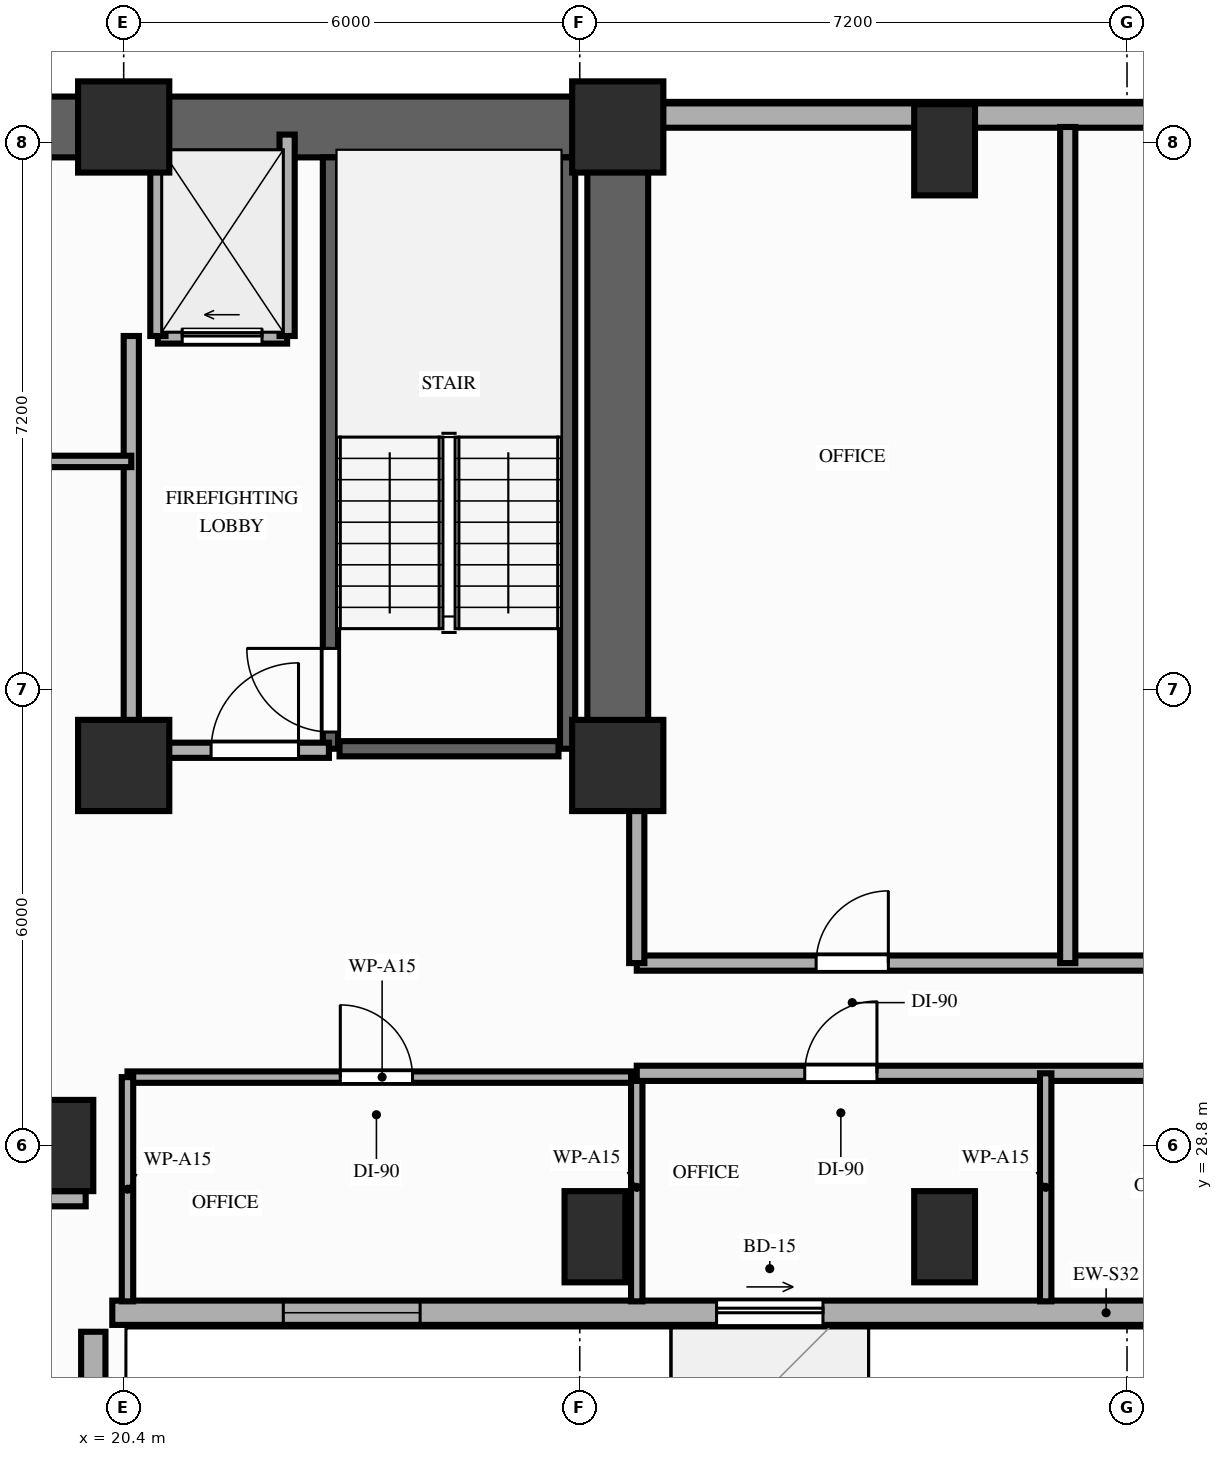
"""IFC4 building model, lengths in metres.
Left out: names, types, materials, properties, quantities, classifications, styles, units other than length and angle.
Written with IfcOpenShell. Run it as: python <this file> out.ifc"""

import sys

from ifc_helpers import new_model, si_unit, direction, frame, frame_2d, origin, origin_2d, place, context, subcontext, project, spatial, rectangle, extrude, element, fill, save


model = new_model("IFC4")
c1 = context("Model", 3, precision=1e-05, world=origin(), true_north=direction((0.0, 1.0)))
c2 = subcontext(c1, "Body", "Model", "MODEL_VIEW")
j1 = project(units=[si_unit("LENGTHUNIT", "METRE"), si_unit("PLANEANGLEUNIT", "RADIAN")], contexts=[c1])
p1 = place(None, origin())
s1 = spatial("IfcSite", under=j1, at=p1, CompositionType="ELEMENT")
p2 = place(p1, origin())
s2 = spatial("IfcBuilding", under=s1, at=p2, CompositionType="ELEMENT")
p3 = place(p2, frame((0.0, 0.0, 86.6)))
s3 = spatial("IfcBuildingStorey", under=s2, at=p3, CompositionType="ELEMENT", Elevation=86.6)
for number, where, z_axis, x_axis in (
    (1, (20.4, 33.8, 0.0), (0.0, 0.0, 1.0), (1.0, 0.0, 0.0)),
    (2, (26.9, 33.8, 0.0), (0.0, 0.0, 1.0), (1.0, 0.0, 0.0)),
    (3, (20.4, 42.2, 0.0), (0.0, 0.0, 1.0), (1.0, 0.0, 0.0)),
    (4, (26.9, 42.2, 0.0), (0.0, 0.0, 1.0), (1.0, 0.0, 0.0)),
):
    element("IfcColumn", number, at=place(p3, frame(where, z_axis=z_axis, x_axis=x_axis)), inside=s3, PredefinedType="COLUMN", context=c2, shape_type="SweptSolid", body=[
        extrude(rectangle(XDim=1.2, YDim=1.2, at=origin_2d()), origin(), (0.0, 0.0, 1.0), 3.2),
    ])
for number, where, z_axis, x_axis in (
    (5, (19.6, 28.8, 0.0), (0.0, 0.0, 1.0), (1.0, 0.0, 0.0)),
    (6, (26.6, 27.6, 0.0), (0.0, 0.0, 1.0), (1.0, 0.0, 0.0)),
    (7, (31.2, 27.6, 0.0), (0.0, 0.0, 1.0), (1.0, 0.0, 0.0)),
    (8, (31.2, 41.9, 0.0), (0.0, 0.0, 1.0), (1.0, 0.0, 0.0)),
):
    element("IfcColumn", number, at=place(p3, frame(where, z_axis=z_axis, x_axis=x_axis)), inside=s3, PredefinedType="COLUMN", context=c2, shape_type="SweptSolid", body=[
        extrude(rectangle(XDim=0.8, YDim=1.2, at=origin_2d()), origin(), (0.0, 0.0, 1.0), 3.2),
    ])
p4 = place(p3, frame((20.0, 8.8, 0.0), z_axis=(0.0, 0.0, 1.0), x_axis=(0.0, 1.0, 0.0)))
e9 = element("IfcWall", 9, at=p4, inside=s3, PredefinedType="STANDARD", context=c2, shape_type="SweptSolid", body=[
    extrude(rectangle(XDim=17.55, YDim=0.32, at=frame_2d((8.775, 0.0))), origin(), (0.0, 0.0, 1.0), 2.4),
])
p5 = place(p4, frame((11.67, 0.0, 0.85)))
e10 = element("IfcOpeningElement", 10, at=p5, cuts=e9, PredefinedType="OPENING", context=c2, shape_type="SweptSolid", body=[
    extrude(rectangle(XDim=1.8, YDim=1.3, at=frame_2d((0.9, 0.65))), frame((0.0, 0.17, 0.0), z_axis=(0.0, -1.0, 0.0), x_axis=(1.0, 0.0, 0.0)), (0.0, 0.0, 1.0), 0.34),
])
p6 = place(p4, frame((5.6, 0.0, 0.85)))
e11 = element("IfcOpeningElement", 11, at=p6, cuts=e9, PredefinedType="OPENING", context=c2, shape_type="SweptSolid", body=[
    extrude(rectangle(XDim=1.8, YDim=1.3, at=frame_2d((0.9, 0.65))), frame((0.0, 0.17, 0.0), z_axis=(0.0, -1.0, 0.0), x_axis=(1.0, 0.0, 0.0)), (0.0, 0.0, 1.0), 0.34),
])
p7 = place(p3, frame((46.4, 42.35, 0.0), z_axis=(0.0, 0.0, 1.0), x_axis=(-1.0, 0.0, 0.0)))
e12 = element("IfcWall", 12, at=p7, inside=s3, PredefinedType="STANDARD", context=c2, shape_type="SweptSolid", body=[
    extrude(rectangle(XDim=19.05, YDim=0.32, at=frame_2d((9.525, 0.0))), origin(), (0.0, 0.0, 1.0), 2.4),
])
p8 = place(p3, frame((20.25, 26.6, 0.0), z_axis=(0.0, 0.0, 1.0), x_axis=(1.0, 0.0, 0.0)))
e13 = element("IfcWall", 13, at=p8, inside=s3, PredefinedType="STANDARD", context=c2, shape_type="SweptSolid", body=[
    extrude(rectangle(XDim=26.15, YDim=0.32, at=frame_2d((13.075, 0.0))), origin(), (0.0, 0.0, 1.0), 2.7),
])
p9 = place(p8, frame((7.95, 0.0, 0.0)))
e14 = element("IfcOpeningElement", 14, at=p9, cuts=e13, PredefinedType="OPENING", context=c2, shape_type="SweptSolid", body=[
    extrude(rectangle(XDim=1.4, YDim=2.1, at=frame_2d((0.7, 1.05))), frame((0.0, 0.17, 0.0), z_axis=(0.0, -1.0, 0.0), x_axis=(1.0, 0.0, 0.0)), (0.0, 0.0, 1.0), 0.34),
])
p10 = place(p8, frame((22.45, 0.0, 0.0)))
e15 = element("IfcOpeningElement", 15, at=p10, cuts=e13, PredefinedType="OPENING", context=c2, shape_type="SweptSolid", body=[
    extrude(rectangle(XDim=1.4, YDim=2.1, at=frame_2d((0.7, 1.05))), frame((0.0, 0.17, 0.0), z_axis=(0.0, -1.0, 0.0), x_axis=(1.0, 0.0, 0.0)), (0.0, 0.0, 1.0), 0.34),
])
p11 = place(p8, frame((2.25, 0.0, 0.85)))
e16 = element("IfcOpeningElement", 16, at=p11, cuts=e13, PredefinedType="OPENING", context=c2, shape_type="SweptSolid", body=[
    extrude(rectangle(XDim=1.8, YDim=1.6, at=frame_2d((0.9, 0.8))), frame((0.0, 0.17, 0.0), z_axis=(0.0, -1.0, 0.0), x_axis=(1.0, 0.0, 0.0)), (0.0, 0.0, 1.0), 0.34),
])
p12 = place(p8, frame((13.65, 0.0, 0.85)))
e17 = element("IfcOpeningElement", 17, at=p12, cuts=e13, PredefinedType="OPENING", context=c2, shape_type="SweptSolid", body=[
    extrude(rectangle(XDim=1.8, YDim=1.6, at=frame_2d((0.9, 0.8))), frame((0.0, 0.17, 0.0), z_axis=(0.0, -1.0, 0.0), x_axis=(1.0, 0.0, 0.0)), (0.0, 0.0, 1.0), 0.34),
])
p13 = place(p3, frame((6.45, 42.2, 0.0), z_axis=(0.0, 0.0, 1.0), x_axis=(1.0, 0.0, 0.0)))
e18 = element("IfcWall", 18, at=p13, inside=s3, PredefinedType="SHEAR", context=c2, shape_type="SweptSolid", body=[
    extrude(rectangle(XDim=20.45, YDim=0.8, at=frame_2d((10.225, 0.0))), origin(), (0.0, 0.0, 1.0), 3.02),
])
p14 = place(p3, frame((26.9, 33.8, 0.0), z_axis=(0.0, 0.0, 1.0), x_axis=(0.0, 1.0, 0.0)))
e19 = element("IfcWall", 19, at=p14, inside=s3, PredefinedType="SHEAR", context=c2, shape_type="SweptSolid", body=[
    extrude(rectangle(XDim=7.95, YDim=0.8, at=frame_2d((3.975, 0.0))), origin(), (0.0, 0.0, 1.0), 3.02),
])
p15 = place(p3, frame((23.12, 34.02, 0.0), z_axis=(0.0, 0.0, 1.0), x_axis=(0.0, 1.0, 0.0)))
e20 = element("IfcWall", 20, at=p15, inside=s3, PredefinedType="SHEAR", context=c2, shape_type="SweptSolid", body=[
    extrude(rectangle(XDim=7.78, YDim=0.2, at=frame_2d((3.89, 0.0))), origin(), (0.0, 0.0, 1.0), 3.02),
])
p16 = place(p15, frame((0.22, 0.0, 0.0)))
e21 = element("IfcOpeningElement", 21, at=p16, cuts=e20, PredefinedType="OPENING", context=c2, shape_type="SweptSolid", body=[
    extrude(rectangle(XDim=1.1, YDim=2.15, at=frame_2d((0.55, 1.075))), frame((0.0, 0.11, 0.0), z_axis=(0.0, -1.0, 0.0), x_axis=(1.0, 0.0, 0.0)), (0.0, 0.0, 1.0), 0.22),
])
p17 = place(p3, frame((26.24, 34.02, 0.0), z_axis=(0.0, 0.0, 1.0), x_axis=(0.0, 1.0, 0.0)))
e22 = element("IfcWall", 22, at=p17, inside=s3, PredefinedType="SHEAR", context=c2, shape_type="SweptSolid", body=[
    extrude(rectangle(XDim=7.78, YDim=0.2, at=frame_2d((3.89, 0.0))), origin(), (0.0, 0.0, 1.0), 3.02),
])
p18 = place(p3, frame((23.24, 34.02, 0.0), z_axis=(0.0, 0.0, 1.0), x_axis=(1.0, 0.0, 0.0)))
e23 = element("IfcWall", 23, at=p18, inside=s3, PredefinedType="SHEAR", context=c2, shape_type="SweptSolid", body=[
    extrude(rectangle(XDim=2.88, YDim=0.2, at=frame_2d((1.44, 0.0))), origin(), (0.0, 0.0, 1.0), 3.02),
])
p19 = place(p3, frame((20.85, 39.45, 0.0), z_axis=(0.0, 0.0, 1.0), x_axis=(1.0, 0.0, 0.0)))
e24 = element("IfcWall", 24, at=p19, inside=s3, PredefinedType="MOVABLE", context=c2, shape_type="SweptSolid", body=[
    extrude(rectangle(XDim=1.7, YDim=0.2, at=frame_2d((0.85, 0.0))), origin(), (0.0, 0.0, 1.0), 3.02),
])
p20 = place(p19, frame((0.32, 0.0, 0.0)))
e25 = element("IfcOpeningElement", 25, at=p20, cuts=e24, PredefinedType="OPENING", context=c2, shape_type="SweptSolid", body=[
    extrude(rectangle(XDim=1.05, YDim=2.15, at=frame_2d((0.525, 1.075))), frame((0.0, 0.11, 0.0), z_axis=(0.0, -1.0, 0.0), x_axis=(1.0, 0.0, 0.0)), (0.0, 0.0, 1.0), 0.22),
])
for number, where, z_axis, x_axis in (
    (26, (20.85, 39.45, 0.0), (0.0, 0.0, 1.0), (0.0, 1.0, 0.0)),
    (27, (22.55, 39.45, 0.0), (0.0, 0.0, 1.0), (0.0, 1.0, 0.0)),
):
    element("IfcWall", number, at=place(p3, frame(where, z_axis=z_axis, x_axis=x_axis)), inside=s3, PredefinedType="MOVABLE", context=c2, shape_type="SweptSolid", body=[
        extrude(rectangle(XDim=2.65, YDim=0.2, at=frame_2d((1.325, 0.0))), origin(), (0.0, 0.0, 1.0), 2.4),
    ])
p21 = place(p3, frame((20.5, 34.0, 0.0), z_axis=(0.0, 0.0, 1.0), x_axis=(0.0, 1.0, 0.0)))
e28 = element("IfcWall", 28, at=p21, inside=s3, PredefinedType="PARTITIONING", context=c2, shape_type="SweptSolid", body=[
    extrude(rectangle(XDim=5.45, YDim=0.2, at=frame_2d((2.725, 0.0))), origin(), (0.0, 0.0, 1.0), 2.4),
])
p22 = place(p3, frame((20.5, 34.0, 0.0), z_axis=(0.0, 0.0, 1.0), x_axis=(1.0, 0.0, 0.0)))
e29 = element("IfcWall", 29, at=p22, inside=s3, PredefinedType="PARTITIONING", context=c2, shape_type="SweptSolid", body=[
    extrude(rectangle(XDim=2.6, YDim=0.2, at=frame_2d((1.3, 0.0))), origin(), (0.0, 0.0, 1.0), 2.4),
])
p23 = place(p22, frame((1.05, 0.0, 0.0)))
e30 = element("IfcOpeningElement", 30, at=p23, cuts=e29, PredefinedType="OPENING", context=c2, shape_type="SweptSolid", body=[
    extrude(rectangle(XDim=1.15, YDim=2.15, at=frame_2d((0.575, 1.075))), frame((0.0, 0.11, 0.0), z_axis=(0.0, -1.0, 0.0), x_axis=(1.0, 0.0, 0.0)), (0.0, 0.0, 1.0), 0.22),
])
p24 = place(p3, frame((12.9, 37.8, 0.0), z_axis=(0.0, 0.0, 1.0), x_axis=(1.0, 0.0, 0.0)))
e31 = element("IfcWall", 31, at=p24, inside=s3, PredefinedType="PARTITIONING", context=c2, shape_type="SweptSolid", body=[
    extrude(rectangle(XDim=7.6, YDim=0.15, at=frame_2d((3.8, 0.0))), origin(), (0.0, 0.0, 1.0), 3.02),
])
p25 = place(p24, frame((3.2, 0.0, 0.0)))
e32 = element("IfcOpeningElement", 32, at=p25, cuts=e31, PredefinedType="OPENING", context=c2, shape_type="SweptSolid", body=[
    extrude(rectangle(XDim=1.0, YDim=2.15, at=frame_2d((0.5, 1.075))), frame((0.0, 0.085, 0.0), z_axis=(0.0, -1.0, 0.0), x_axis=(1.0, 0.0, 0.0)), (0.0, 0.0, 1.0), 0.17),
])
p26 = place(p3, frame((9.06, 28.1, 0.0), z_axis=(0.0, 0.0, 1.0), x_axis=(1.0, 0.0, 0.0)))
e33 = element("IfcWall", 33, at=p26, inside=s3, PredefinedType="PARTITIONING", context=c2, shape_type="SweptSolid", body=[
    extrude(rectangle(XDim=10.84, YDim=0.2, at=frame_2d((5.42, 0.0))), origin(), (0.0, 0.0, 1.0), 2.4),
])
p27 = place(p3, frame((20.45, 29.7, 0.0), z_axis=(0.0, 0.0, 1.0), x_axis=(1.0, 0.0, 0.0)))
e34 = element("IfcWall", 34, at=p27, inside=s3, PredefinedType="PARTITIONING", context=c2, shape_type="SweptSolid", body=[
    extrude(rectangle(XDim=6.7, YDim=0.15, at=frame_2d((3.35, 0.0))), origin(), (0.0, 0.0, 1.0), 3.02),
])
p28 = place(p27, frame((2.8, 0.0, 0.0)))
e35 = element("IfcOpeningElement", 35, at=p28, cuts=e34, PredefinedType="OPENING", context=c2, shape_type="SweptSolid", body=[
    extrude(rectangle(XDim=0.95, YDim=2.15, at=frame_2d((0.475, 1.075))), frame((0.0, 0.085, 0.0), z_axis=(0.0, -1.0, 0.0), x_axis=(1.0, 0.0, 0.0)), (0.0, 0.0, 1.0), 0.17),
])
p29 = place(p3, frame((20.45, 26.75, 0.0), z_axis=(0.0, 0.0, 1.0), x_axis=(0.0, 1.0, 0.0)))
e36 = element("IfcWall", 36, at=p29, inside=s3, PredefinedType="PARTITIONING", context=c2, shape_type="SweptSolid", body=[
    extrude(rectangle(XDim=2.95, YDim=0.15, at=frame_2d((1.475, 0.0))), origin(), (0.0, 0.0, 1.0), 2.4),
])
p30 = place(p3, frame((27.15, 26.75, 0.0), z_axis=(0.0, 0.0, 1.0), x_axis=(0.0, 1.0, 0.0)))
e37 = element("IfcWall", 37, at=p30, inside=s3, PredefinedType="PARTITIONING", context=c2, shape_type="SweptSolid", body=[
    extrude(rectangle(XDim=3.0, YDim=0.15, at=frame_2d((1.5, 0.0))), origin(), (0.0, 0.0, 1.0), 2.4),
])
p31 = place(p3, frame((27.15, 29.75, 0.0), z_axis=(0.0, 0.0, 1.0), x_axis=(1.0, 0.0, 0.0)))
e38 = element("IfcWall", 38, at=p31, inside=s3, PredefinedType="PARTITIONING", context=c2, shape_type="SweptSolid", body=[
    extrude(rectangle(XDim=14.55, YDim=0.2, at=frame_2d((7.275, 0.0))), origin(), (0.0, 0.0, 1.0), 2.4),
])
p32 = place(p31, frame((2.21, 0.0, 0.0)))
e39 = element("IfcOpeningElement", 39, at=p32, cuts=e38, PredefinedType="OPENING", context=c2, shape_type="SweptSolid", body=[
    extrude(rectangle(XDim=0.95, YDim=2.15, at=frame_2d((0.475, 1.075))), frame((0.0, 0.11, 0.0), z_axis=(0.0, -1.0, 0.0), x_axis=(1.0, 0.0, 0.0)), (0.0, 0.0, 1.0), 0.22),
])
p33 = place(p31, frame((9.49, 0.0, 0.0)))
e40 = element("IfcOpeningElement", 40, at=p33, cuts=e38, PredefinedType="OPENING", context=c2, shape_type="SweptSolid", body=[
    extrude(rectangle(XDim=0.95, YDim=2.15, at=frame_2d((0.475, 1.075))), frame((0.0, 0.11, 0.0), z_axis=(0.0, -1.0, 0.0), x_axis=(1.0, 0.0, 0.0)), (0.0, 0.0, 1.0), 0.22),
])
p34 = place(p3, frame((27.15, 31.2, 0.0), z_axis=(0.0, 0.0, 1.0), x_axis=(1.0, 0.0, 0.0)))
e41 = element("IfcWall", 41, at=p34, inside=s3, PredefinedType="PARTITIONING", context=c2, shape_type="SweptSolid", body=[
    extrude(rectangle(XDim=14.55, YDim=0.2, at=frame_2d((7.275, 0.0))), origin(), (0.0, 0.0, 1.0), 2.4),
])
p35 = place(p34, frame((2.36, 0.0, 0.0)))
e42 = element("IfcOpeningElement", 42, at=p35, cuts=e41, PredefinedType="OPENING", context=c2, shape_type="SweptSolid", body=[
    extrude(rectangle(XDim=0.95, YDim=2.15, at=frame_2d((0.475, 1.075))), frame((0.0, 0.11, 0.0), z_axis=(0.0, -1.0, 0.0), x_axis=(1.0, 0.0, 0.0)), (0.0, 0.0, 1.0), 0.22),
])
p36 = place(p34, frame((7.23, 0.0, 0.0)))
e43 = element("IfcOpeningElement", 43, at=p36, cuts=e41, PredefinedType="OPENING", context=c2, shape_type="SweptSolid", body=[
    extrude(rectangle(XDim=0.95, YDim=2.15, at=frame_2d((0.475, 1.075))), frame((0.0, 0.11, 0.0), z_axis=(0.0, -1.0, 0.0), x_axis=(1.0, 0.0, 0.0)), (0.0, 0.0, 1.0), 0.22),
])
p37 = place(p34, frame((11.67, 0.0, 0.0)))
e44 = element("IfcOpeningElement", 44, at=p37, cuts=e41, PredefinedType="OPENING", context=c2, shape_type="SweptSolid", body=[
    extrude(rectangle(XDim=0.95, YDim=2.15, at=frame_2d((0.475, 1.075))), frame((0.0, 0.11, 0.0), z_axis=(0.0, -1.0, 0.0), x_axis=(1.0, 0.0, 0.0)), (0.0, 0.0, 1.0), 0.22),
])
p38 = place(p3, frame((27.15, 31.2, 0.0), z_axis=(0.0, 0.0, 1.0), x_axis=(0.0, 1.0, 0.0)))
e45 = element("IfcWall", 45, at=p38, inside=s3, PredefinedType="PARTITIONING", context=c2, shape_type="SweptSolid", body=[
    extrude(rectangle(XDim=2.48, YDim=0.2, at=frame_2d((1.24, 0.0))), origin(), (0.0, 0.0, 1.0), 2.4),
])
p39 = place(p3, frame((32.53, 26.75, 0.0), z_axis=(0.0, 0.0, 1.0), x_axis=(0.0, 1.0, 0.0)))
e46 = element("IfcWall", 46, at=p39, inside=s3, PredefinedType="PARTITIONING", context=c2, shape_type="SweptSolid", body=[
    extrude(rectangle(XDim=3.0, YDim=0.15, at=frame_2d((1.5, 0.0))), origin(), (0.0, 0.0, 1.0), 2.4),
])
p40 = place(p3, frame((32.82, 31.2, 0.0), z_axis=(0.0, 0.0, 1.0), x_axis=(0.0, 1.0, 0.0)))
e47 = element("IfcWall", 47, at=p40, inside=s3, PredefinedType="PARTITIONING", context=c2, shape_type="SweptSolid", body=[
    extrude(rectangle(XDim=11.0, YDim=0.2, at=frame_2d((5.5, 0.0))), origin(), (0.0, 0.0, 1.0), 2.4),
])
p41 = place(p9, origin())
e48 = element("IfcDoor", 48, at=p41, inside=s3, OperationType="SLIDING_TO_RIGHT", PredefinedType="DOOR", context=c2, shape_type="SweptSolid", body=[
    extrude(rectangle(XDim=1.4, YDim=2.1, at=frame_2d((0.7, 1.05))), frame((0.0, 0.025, 0.0), z_axis=(0.0, -1.0, 0.0), x_axis=(1.0, 0.0, 0.0)), (0.0, 0.0, 1.0), 0.05),
])
fill(e14, e48)
p42 = place(p11, origin())
e49 = element("IfcWindow", 49, at=p42, inside=s3, PartitioningType="SINGLE_PANEL", PredefinedType="WINDOW", context=c2, shape_type="SweptSolid", body=[
    extrude(rectangle(XDim=1.8, YDim=1.6, at=frame_2d((0.9, 0.8))), frame((0.0, 0.03, 0.0), z_axis=(0.0, -1.0, 0.0), x_axis=(1.0, 0.0, 0.0)), (0.0, 0.0, 1.0), 0.06),
])
fill(e16, e49)
p43 = place(p16, origin())
e50 = element("IfcDoor", 50, at=p43, inside=s3, OperationType="SINGLE_SWING_RIGHT", PredefinedType="DOOR", context=c2, shape_type="SweptSolid", body=[
    extrude(rectangle(XDim=1.1, YDim=2.15, at=frame_2d((0.55, 1.075))), frame((0.0, 0.025, 0.0), z_axis=(0.0, -1.0, 0.0), x_axis=(1.0, 0.0, 0.0)), (0.0, 0.0, 1.0), 0.05),
])
fill(e21, e50)
p44 = place(p20, origin())
e51 = element("IfcDoor", 51, at=p44, inside=s3, OperationType="SLIDING_TO_LEFT", PredefinedType="DOOR", context=c2, shape_type="SweptSolid", body=[
    extrude(rectangle(XDim=1.05, YDim=2.15, at=frame_2d((0.525, 1.075))), frame((0.0, 0.025, 0.0), z_axis=(0.0, -1.0, 0.0), x_axis=(1.0, 0.0, 0.0)), (0.0, 0.0, 1.0), 0.05),
])
fill(e25, e51)
p45 = place(p23, origin())
e52 = element("IfcDoor", 52, at=p45, inside=s3, OperationType="SINGLE_SWING_RIGHT", PredefinedType="DOOR", context=c2, shape_type="SweptSolid", body=[
    extrude(rectangle(XDim=1.15, YDim=2.15, at=frame_2d((0.575, 1.075))), frame((0.0, 0.025, 0.0), z_axis=(0.0, -1.0, 0.0), x_axis=(1.0, 0.0, 0.0)), (0.0, 0.0, 1.0), 0.05),
])
fill(e30, e52)
p46 = place(p28, origin())
e53 = element("IfcDoor", 53, at=p46, inside=s3, OperationType="SINGLE_SWING_LEFT", PredefinedType="DOOR", context=c2, shape_type="SweptSolid", body=[
    extrude(rectangle(XDim=0.95, YDim=2.15, at=frame_2d((0.475, 1.075))), frame((0.0, 0.025, 0.0), z_axis=(0.0, -1.0, 0.0), x_axis=(1.0, 0.0, 0.0)), (0.0, 0.0, 1.0), 0.05),
])
fill(e35, e53)
p47 = place(p32, origin())
e54 = element("IfcDoor", 54, at=p47, inside=s3, OperationType="SINGLE_SWING_RIGHT", PredefinedType="DOOR", context=c2, shape_type="SweptSolid", body=[
    extrude(rectangle(XDim=0.95, YDim=2.15, at=frame_2d((0.475, 1.075))), frame((0.0, 0.025, 0.0), z_axis=(0.0, -1.0, 0.0), x_axis=(1.0, 0.0, 0.0)), (0.0, 0.0, 1.0), 0.05),
])
fill(e39, e54)
p48 = place(p35, origin())
e55 = element("IfcDoor", 55, at=p48, inside=s3, OperationType="SINGLE_SWING_RIGHT", PredefinedType="DOOR", context=c2, shape_type="SweptSolid", body=[
    extrude(rectangle(XDim=0.95, YDim=2.15, at=frame_2d((0.475, 1.075))), frame((0.0, 0.025, 0.0), z_axis=(0.0, -1.0, 0.0), x_axis=(1.0, 0.0, 0.0)), (0.0, 0.0, 1.0), 0.05),
])
fill(e42, e55)
save(model, sys.argv[1])
